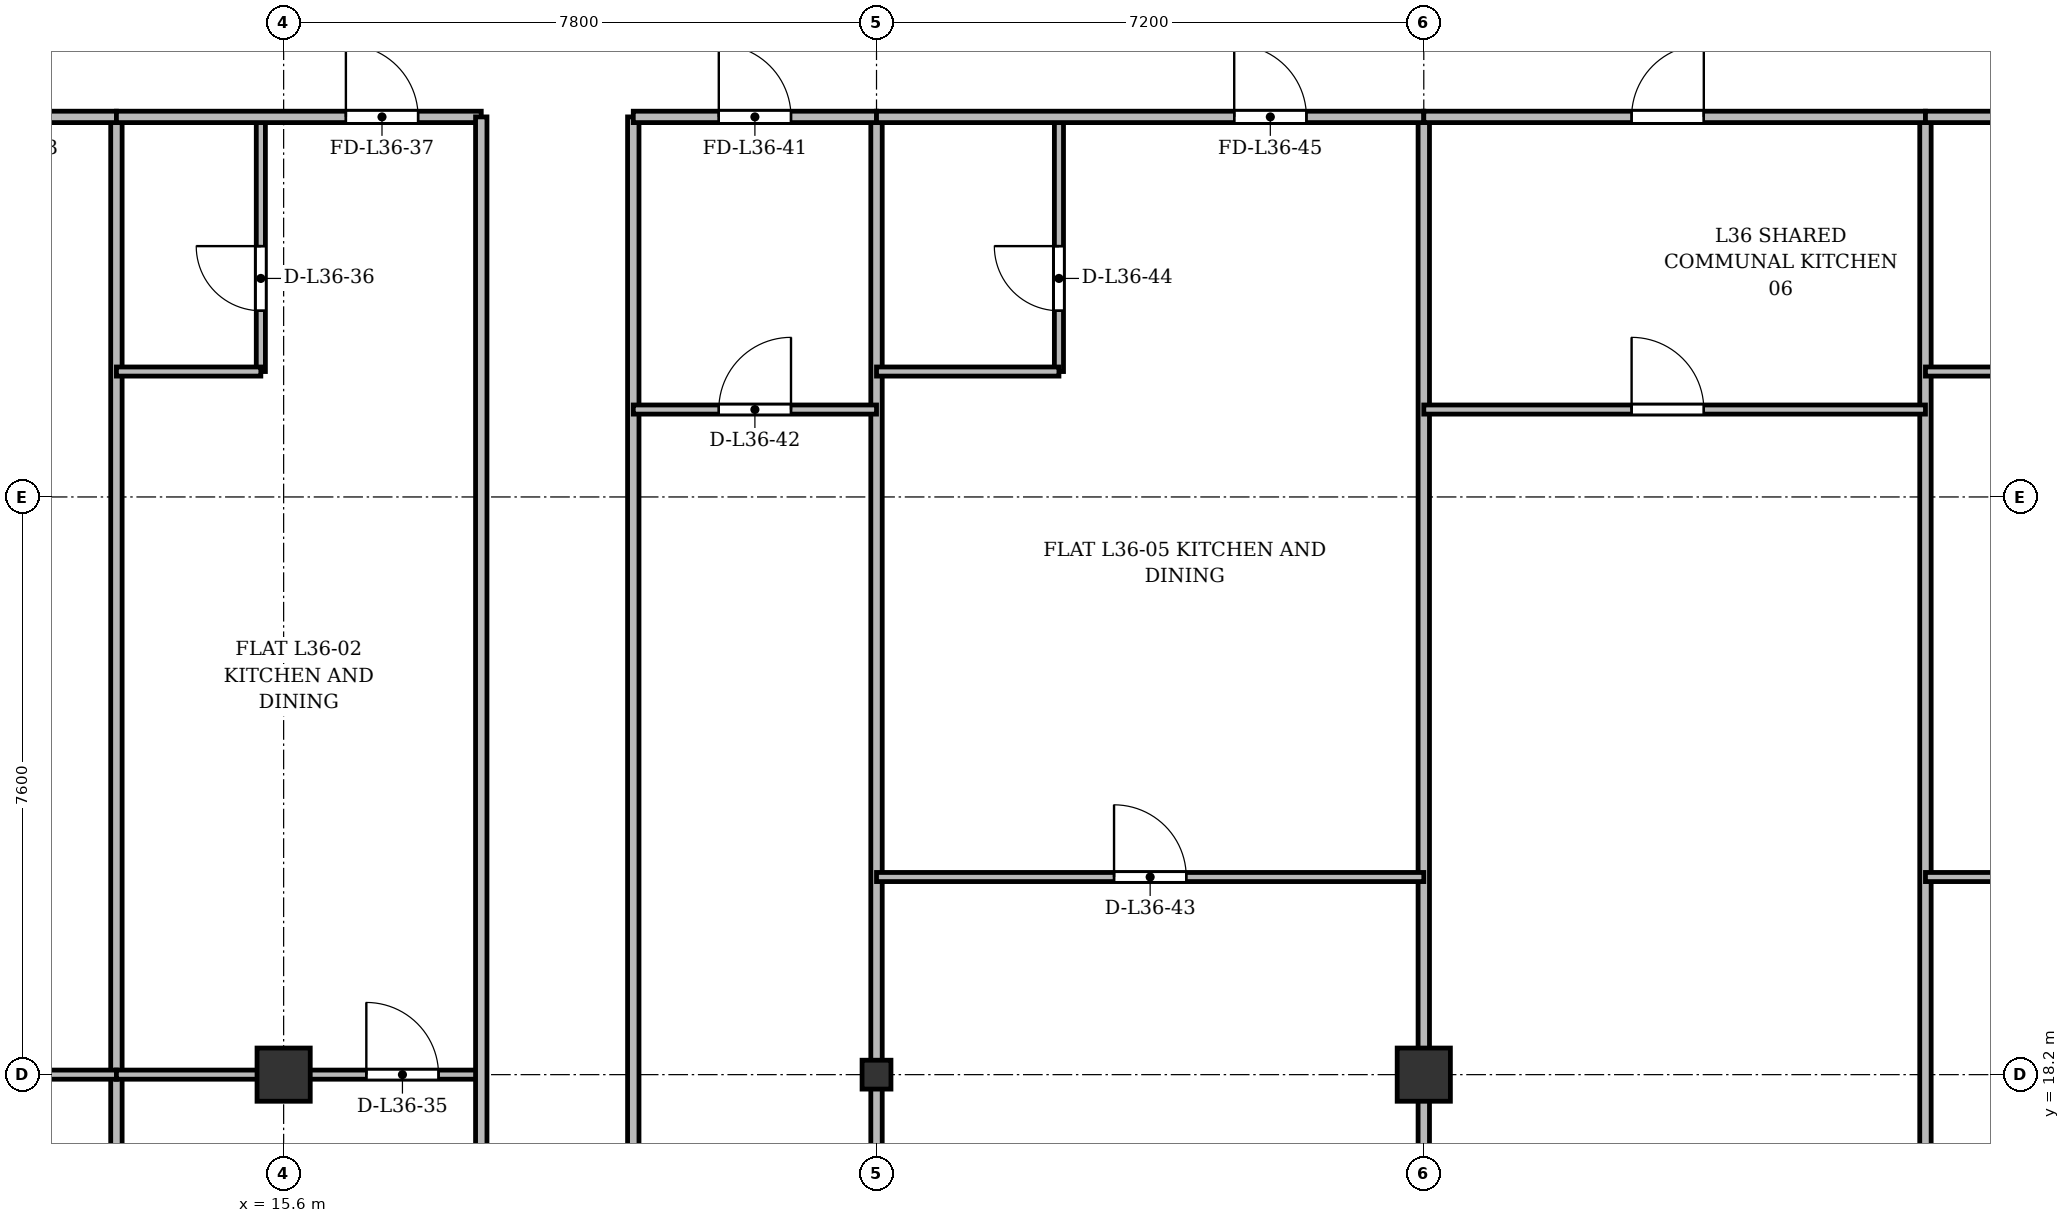
"""IFC4 building model, lengths in metres.
Left out: names, types, materials, properties, quantities, classifications, styles, units other than length and angle.
Written with IfcOpenShell. Run it as: python <this file> out.ifc"""

import sys

from ifc_helpers import new_model, si_unit, direction, frame, frame_2d, origin, origin_2d, place, context, subcontext, project, spatial, rectangle, i_section, extrude, source, transform, mapped, element, fill, save


model = new_model("IFC4")
c1 = context("Model", 3, precision=1e-05, world=origin(), true_north=direction((0.0, 1.0)))
c2 = subcontext(c1, "Body", "Model", "MODEL_VIEW")
j1 = project(units=[si_unit("LENGTHUNIT", "METRE"), si_unit("PLANEANGLEUNIT", "RADIAN")], contexts=[c1])
p1 = place(None, origin())
s1 = spatial("IfcSite", under=j1, at=p1, CompositionType="ELEMENT")
p2 = place(p1, origin())
s2 = spatial("IfcBuilding", under=s1, at=p2, CompositionType="ELEMENT")
p3 = place(p2, frame((0.0, 0.0, 139.3)))
s3 = spatial("IfcBuildingStorey", under=s2, at=p3, CompositionType="ELEMENT", Elevation=139.3)
m1 = source(origin(), c2, "Body", "SweptSolid", [
    extrude(rectangle(XDim=0.7, YDim=0.7, at=origin_2d()), origin(), (0.0, 0.0, 1.0), 3.6),
])
p4 = place(p3, frame((15.6, 18.2, 0.0), z_axis=(0.0, 0.0, 1.0), x_axis=(1.0, 0.0, 0.0)))
e1 = element("IfcColumn", 1, at=p4, inside=s3, PredefinedType="COLUMN", context=c2, shape_type="MappedRepresentation", body=[
    mapped(m1, transform((0.0, 0.0, 0.0), x_axis=(1.0, 0.0, 0.0), y_axis=(0.0, 1.0, 0.0), z_axis=(0.0, 0.0, 1.0), scale=1.0)),
])
m2 = source(origin(), c2, "Body", "SweptSolid", [
    extrude(i_section(OverallWidth=0.38, OverallDepth=0.38, WebThickness=0.02, FlangeThickness=0.03, at=origin_2d()), origin(), (0.0, 0.0, 1.0), 3.6),
])
p5 = place(p3, frame((23.4, 18.2, 0.0), z_axis=(0.0, 0.0, 1.0), x_axis=(1.0, 0.0, 0.0)))
e2 = element("IfcColumn", 2, at=p5, inside=s3, PredefinedType="COLUMN", context=c2, shape_type="MappedRepresentation", body=[
    mapped(m2, transform((0.0, 0.0, 0.0), x_axis=(1.0, 0.0, 0.0), y_axis=(0.0, 1.0, 0.0), z_axis=(0.0, 0.0, 1.0), scale=1.0)),
])
p6 = place(p3, frame((30.6, 18.2, 0.0), z_axis=(0.0, 0.0, 1.0), x_axis=(1.0, 0.0, 0.0)))
e3 = element("IfcColumn", 3, at=p6, inside=s3, PredefinedType="COLUMN", context=c2, shape_type="MappedRepresentation", body=[
    mapped(m1, transform((0.0, 0.0, 0.0), x_axis=(1.0, 0.0, 0.0), y_axis=(0.0, 1.0, 0.0), z_axis=(0.0, 0.0, 1.0), scale=1.0)),
])
p7 = place(p3, frame((13.4, 3.525, 0.0), z_axis=(0.0, 0.0, 1.0), x_axis=(0.0, 1.0, 0.0)))
e4 = element("IfcWall", 4, at=p7, inside=s3, PredefinedType="PARTITIONING", context=c2, shape_type="SweptSolid", body=[
    extrude(rectangle(XDim=27.275, YDim=0.15, at=frame_2d((13.638, 0.0))), origin(), (0.0, 0.0, 1.0), 2.75),
])
for number, where, z_axis, x_axis in (
    (5, (23.4, 3.525, 0.0), (0.0, 0.0, 1.0), (0.0, 1.0, 0.0)),
    (6, (30.6, 3.525, 0.0), (0.0, 0.0, 1.0), (0.0, 1.0, 0.0)),
):
    element("IfcWall", number, at=place(p3, frame(where, z_axis=z_axis, x_axis=x_axis)), inside=s3, PredefinedType="PARTITIONING", context=c2, shape_type="SweptSolid", body=[
        extrude(rectangle(XDim=27.275, YDim=0.15, at=frame_2d((13.638, 0.0))), origin(), (0.0, 0.0, 1.0), 2.85),
    ])
p8 = place(p3, frame((37.2, 3.525, 0.0), z_axis=(0.0, 0.0, 1.0), x_axis=(0.0, 1.0, 0.0)))
e7 = element("IfcWall", 7, at=p8, inside=s3, PredefinedType="PARTITIONING", context=c2, shape_type="SweptSolid", body=[
    extrude(rectangle(XDim=27.275, YDim=0.15, at=frame_2d((13.638, 0.0))), origin(), (0.0, 0.0, 1.0), 2.75),
])
p9 = place(p3, frame((8.04, 18.2, 0.0), z_axis=(0.0, 0.0, 1.0), x_axis=(1.0, 0.0, 0.0)))
e8 = element("IfcWall", 8, at=p9, inside=s3, PredefinedType="PARTITIONING", context=c2, shape_type="SweptSolid", body=[
    extrude(rectangle(XDim=5.36, YDim=0.12, at=frame_2d((2.68, 0.0))), origin(), (0.0, 0.0, 1.0), 2.75),
])
p10 = place(p9, frame((2.205, 0.0, 0.0)))
e9 = element("IfcOpeningElement", 9, at=p10, cuts=e8, PredefinedType="OPENING", context=c2, shape_type="SweptSolid", body=[
    extrude(rectangle(XDim=0.95, YDim=2.15, at=frame_2d((0.475, 1.075))), frame((0.0, 0.07, 0.0), z_axis=(0.0, -1.0, 0.0), x_axis=(1.0, 0.0, 0.0)), (0.0, 0.0, 1.0), 0.14),
])
p11 = place(p3, frame((8.025, 30.8, 0.0), z_axis=(0.0, 0.0, 1.0), x_axis=(1.0, 0.0, 0.0)))
e10 = element("IfcWall", 10, at=p11, inside=s3, PredefinedType="PARTITIONING", context=c2, shape_type="SweptSolid", body=[
    extrude(rectangle(XDim=5.375, YDim=0.15, at=frame_2d((2.688, 0.0))), origin(), (0.0, 0.0, 1.0), 2.85),
])
p12 = place(p11, frame((3.44, 0.0, 0.0)))
e11 = element("IfcOpeningElement", 11, at=p12, cuts=e10, PredefinedType="OPENING", context=c2, shape_type="SweptSolid", body=[
    extrude(rectangle(XDim=0.95, YDim=2.15, at=frame_2d((0.475, 1.075))), frame((0.0, 0.085, 0.0), z_axis=(0.0, -1.0, 0.0), x_axis=(1.0, 0.0, 0.0)), (0.0, 0.0, 1.0), 0.17),
])
p13 = place(p3, frame((13.4, 18.2, 0.0), z_axis=(0.0, 0.0, 1.0), x_axis=(1.0, 0.0, 0.0)))
e12 = element("IfcWall", 12, at=p13, inside=s3, PredefinedType="PARTITIONING", context=c2, shape_type="SweptSolid", body=[
    extrude(rectangle(XDim=4.8, YDim=0.12, at=frame_2d((2.4, 0.0))), origin(), (0.0, 0.0, 1.0), 2.75),
])
p14 = place(p13, frame((3.288, 0.0, 0.0)))
e13 = element("IfcOpeningElement", 13, at=p14, cuts=e12, PredefinedType="OPENING", context=c2, shape_type="SweptSolid", body=[
    extrude(rectangle(XDim=0.95, YDim=2.15, at=frame_2d((0.475, 1.075))), frame((0.0, 0.07, 0.0), z_axis=(0.0, -1.0, 0.0), x_axis=(1.0, 0.0, 0.0)), (0.0, 0.0, 1.0), 0.14),
])
p15 = place(p3, frame((15.3, 27.45, 0.0), z_axis=(0.0, 0.0, 1.0), x_axis=(0.0, 1.0, 0.0)))
e14 = element("IfcWall", 14, at=p15, inside=s3, PredefinedType="PARTITIONING", context=c2, shape_type="SweptSolid", body=[
    extrude(rectangle(XDim=3.35, YDim=0.12, at=frame_2d((1.675, 0.0))), origin(), (0.0, 0.0, 1.0), 3.35),
])
p16 = place(p15, frame((0.8, 0.0, 0.0)))
e15 = element("IfcOpeningElement", 15, at=p16, cuts=e14, PredefinedType="OPENING", context=c2, shape_type="SweptSolid", body=[
    extrude(rectangle(XDim=0.85, YDim=2.1, at=frame_2d((0.425, 1.05))), frame((0.0, 0.07, 0.0), z_axis=(0.0, -1.0, 0.0), x_axis=(1.0, 0.0, 0.0)), (0.0, 0.0, 1.0), 0.14),
])
p17 = place(p3, frame((13.4, 27.45, 0.0), z_axis=(0.0, 0.0, 1.0), x_axis=(1.0, 0.0, 0.0)))
e16 = element("IfcWall", 16, at=p17, inside=s3, PredefinedType="PARTITIONING", context=c2, shape_type="SweptSolid", body=[
    extrude(rectangle(XDim=1.9, YDim=0.12, at=frame_2d((0.95, 0.0))), origin(), (0.0, 0.0, 1.0), 3.35),
])
p18 = place(p3, frame((13.4, 30.8, 0.0), z_axis=(0.0, 0.0, 1.0), x_axis=(1.0, 0.0, 0.0)))
e17 = element("IfcWall", 17, at=p18, inside=s3, PredefinedType="PARTITIONING", context=c2, shape_type="SweptSolid", body=[
    extrude(rectangle(XDim=4.8, YDim=0.15, at=frame_2d((2.4, 0.0))), origin(), (0.0, 0.0, 1.0), 2.85),
])
p19 = place(p18, frame((3.019, 0.0, 0.0)))
e18 = element("IfcOpeningElement", 18, at=p19, cuts=e17, PredefinedType="OPENING", context=c2, shape_type="SweptSolid", body=[
    extrude(rectangle(XDim=0.95, YDim=2.15, at=frame_2d((0.475, 1.075))), frame((0.0, 0.085, 0.0), z_axis=(0.0, -1.0, 0.0), x_axis=(1.0, 0.0, 0.0)), (0.0, 0.0, 1.0), 0.17),
])
for number, where, z_axis, x_axis in (
    (19, (18.2, 3.525, 0.0), (0.0, 0.0, 1.0), (0.0, 1.0, 0.0)),
    (20, (20.2, 3.525, 0.0), (0.0, 0.0, 1.0), (0.0, 1.0, 0.0)),
):
    element("IfcWall", number, at=place(p3, frame(where, z_axis=z_axis, x_axis=x_axis)), inside=s3, PredefinedType="PARTITIONING", context=c2, shape_type="SweptSolid", body=[
        extrude(rectangle(XDim=27.275, YDim=0.15, at=frame_2d((13.638, 0.0))), origin(), (0.0, 0.0, 1.0), 2.75),
    ])
p20 = place(p3, frame((20.2, 30.8, 0.0), z_axis=(0.0, 0.0, 1.0), x_axis=(1.0, 0.0, 0.0)))
e21 = element("IfcWall", 21, at=p20, inside=s3, PredefinedType="PARTITIONING", context=c2, shape_type="SweptSolid", body=[
    extrude(rectangle(XDim=3.2, YDim=0.15, at=frame_2d((1.6, 0.0))), origin(), (0.0, 0.0, 1.0), 2.85),
])
p21 = place(p20, frame((1.125, 0.0, 0.0)))
e22 = element("IfcOpeningElement", 22, at=p21, cuts=e21, PredefinedType="OPENING", context=c2, shape_type="SweptSolid", body=[
    extrude(rectangle(XDim=0.95, YDim=2.15, at=frame_2d((0.475, 1.075))), frame((0.0, 0.085, 0.0), z_axis=(0.0, -1.0, 0.0), x_axis=(1.0, 0.0, 0.0)), (0.0, 0.0, 1.0), 0.17),
])
p22 = place(p3, frame((20.2, 26.95, 0.0), z_axis=(0.0, 0.0, 1.0), x_axis=(1.0, 0.0, 0.0)))
e23 = element("IfcWall", 23, at=p22, inside=s3, PredefinedType="PARTITIONING", context=c2, shape_type="SweptSolid", body=[
    extrude(rectangle(XDim=3.2, YDim=0.12, at=frame_2d((1.6, 0.0))), origin(), (0.0, 0.0, 1.0), 2.85),
])
p23 = place(p22, frame((1.125, 0.0, 0.0)))
e24 = element("IfcOpeningElement", 24, at=p23, cuts=e23, PredefinedType="OPENING", context=c2, shape_type="SweptSolid", body=[
    extrude(rectangle(XDim=0.95, YDim=2.15, at=frame_2d((0.475, 1.075))), frame((0.0, 0.07, 0.0), z_axis=(0.0, -1.0, 0.0), x_axis=(1.0, 0.0, 0.0)), (0.0, 0.0, 1.0), 0.14),
])
p24 = place(p3, frame((23.4, 20.8, 0.0), z_axis=(0.0, 0.0, 1.0), x_axis=(1.0, 0.0, 0.0)))
e25 = element("IfcWall", 25, at=p24, inside=s3, PredefinedType="PARTITIONING", context=c2, shape_type="SweptSolid", body=[
    extrude(rectangle(XDim=7.2, YDim=0.12, at=frame_2d((3.6, 0.0))), origin(), (0.0, 0.0, 1.0), 2.85),
])
p25 = place(p24, frame((3.125, 0.0, 0.0)))
e26 = element("IfcOpeningElement", 26, at=p25, cuts=e25, PredefinedType="OPENING", context=c2, shape_type="SweptSolid", body=[
    extrude(rectangle(XDim=0.95, YDim=2.15, at=frame_2d((0.475, 1.075))), frame((0.0, 0.07, 0.0), z_axis=(0.0, -1.0, 0.0), x_axis=(1.0, 0.0, 0.0)), (0.0, 0.0, 1.0), 0.14),
])
p26 = place(p3, frame((25.8, 27.45, 0.0), z_axis=(0.0, 0.0, 1.0), x_axis=(0.0, 1.0, 0.0)))
e27 = element("IfcWall", 27, at=p26, inside=s3, PredefinedType="PARTITIONING", context=c2, shape_type="SweptSolid", body=[
    extrude(rectangle(XDim=3.35, YDim=0.12, at=frame_2d((1.675, 0.0))), origin(), (0.0, 0.0, 1.0), 3.35),
])
p27 = place(p26, frame((0.8, 0.0, 0.0)))
e28 = element("IfcOpeningElement", 28, at=p27, cuts=e27, PredefinedType="OPENING", context=c2, shape_type="SweptSolid", body=[
    extrude(rectangle(XDim=0.85, YDim=2.1, at=frame_2d((0.425, 1.05))), frame((0.0, 0.07, 0.0), z_axis=(0.0, -1.0, 0.0), x_axis=(1.0, 0.0, 0.0)), (0.0, 0.0, 1.0), 0.14),
])
p28 = place(p3, frame((23.4, 27.45, 0.0), z_axis=(0.0, 0.0, 1.0), x_axis=(1.0, 0.0, 0.0)))
e29 = element("IfcWall", 29, at=p28, inside=s3, PredefinedType="PARTITIONING", context=c2, shape_type="SweptSolid", body=[
    extrude(rectangle(XDim=2.4, YDim=0.12, at=frame_2d((1.2, 0.0))), origin(), (0.0, 0.0, 1.0), 2.85),
])
p29 = place(p3, frame((23.4, 30.8, 0.0), z_axis=(0.0, 0.0, 1.0), x_axis=(1.0, 0.0, 0.0)))
e30 = element("IfcWall", 30, at=p29, inside=s3, PredefinedType="PARTITIONING", context=c2, shape_type="SweptSolid", body=[
    extrude(rectangle(XDim=7.2, YDim=0.15, at=frame_2d((3.6, 0.0))), origin(), (0.0, 0.0, 1.0), 2.85),
])
p30 = place(p29, frame((4.706, 0.0, 0.0)))
e31 = element("IfcOpeningElement", 31, at=p30, cuts=e30, PredefinedType="OPENING", context=c2, shape_type="SweptSolid", body=[
    extrude(rectangle(XDim=0.95, YDim=2.15, at=frame_2d((0.475, 1.075))), frame((0.0, 0.085, 0.0), z_axis=(0.0, -1.0, 0.0), x_axis=(1.0, 0.0, 0.0)), (0.0, 0.0, 1.0), 0.17),
])
p31 = place(p3, frame((30.6, 30.8, 0.0), z_axis=(0.0, 0.0, 1.0), x_axis=(1.0, 0.0, 0.0)))
e32 = element("IfcWall", 32, at=p31, inside=s3, PredefinedType="PARTITIONING", context=c2, shape_type="SweptSolid", body=[
    extrude(rectangle(XDim=6.6, YDim=0.15, at=frame_2d((3.3, 0.0))), origin(), (0.0, 0.0, 1.0), 2.85),
])
p32 = place(p31, frame((2.734, 0.0, 0.0)))
e33 = element("IfcOpeningElement", 33, at=p32, cuts=e32, PredefinedType="OPENING", context=c2, shape_type="SweptSolid", body=[
    extrude(rectangle(XDim=0.95, YDim=2.15, at=frame_2d((0.475, 1.075))), frame((0.0, 0.085, 0.0), z_axis=(0.0, -1.0, 0.0), x_axis=(1.0, 0.0, 0.0)), (0.0, 0.0, 1.0), 0.17),
])
p33 = place(p3, frame((30.6, 26.95, 0.0), z_axis=(0.0, 0.0, 1.0), x_axis=(1.0, 0.0, 0.0)))
e34 = element("IfcWall", 34, at=p33, inside=s3, PredefinedType="PARTITIONING", context=c2, shape_type="SweptSolid", body=[
    extrude(rectangle(XDim=6.6, YDim=0.12, at=frame_2d((3.3, 0.0))), origin(), (0.0, 0.0, 1.0), 2.85),
])
p34 = place(p33, frame((2.734, 0.0, 0.0)))
e35 = element("IfcOpeningElement", 35, at=p34, cuts=e34, PredefinedType="OPENING", context=c2, shape_type="SweptSolid", body=[
    extrude(rectangle(XDim=0.95, YDim=2.15, at=frame_2d((0.475, 1.075))), frame((0.0, 0.07, 0.0), z_axis=(0.0, -1.0, 0.0), x_axis=(1.0, 0.0, 0.0)), (0.0, 0.0, 1.0), 0.14),
])
p35 = place(p3, frame((37.2, 20.8, 0.0), z_axis=(0.0, 0.0, 1.0), x_axis=(1.0, 0.0, 0.0)))
e36 = element("IfcWall", 36, at=p35, inside=s3, PredefinedType="PARTITIONING", context=c2, shape_type="SweptSolid", body=[
    extrude(rectangle(XDim=6.6, YDim=0.12, at=frame_2d((3.3, 0.0))), origin(), (0.0, 0.0, 1.0), 2.85),
])
p36 = place(p35, frame((2.734, 0.0, 0.0)))
e37 = element("IfcOpeningElement", 37, at=p36, cuts=e36, PredefinedType="OPENING", context=c2, shape_type="SweptSolid", body=[
    extrude(rectangle(XDim=0.95, YDim=2.15, at=frame_2d((0.475, 1.075))), frame((0.0, 0.07, 0.0), z_axis=(0.0, -1.0, 0.0), x_axis=(1.0, 0.0, 0.0)), (0.0, 0.0, 1.0), 0.14),
])
p37 = place(p3, frame((37.2, 27.45, 0.0), z_axis=(0.0, 0.0, 1.0), x_axis=(1.0, 0.0, 0.0)))
e38 = element("IfcWall", 38, at=p37, inside=s3, PredefinedType="PARTITIONING", context=c2, shape_type="SweptSolid", body=[
    extrude(rectangle(XDim=2.294, YDim=0.12, at=frame_2d((1.147, 0.0))), origin(), (0.0, 0.0, 1.0), 3.35),
])
p38 = place(p3, frame((37.2, 30.8, 0.0), z_axis=(0.0, 0.0, 1.0), x_axis=(1.0, 0.0, 0.0)))
e39 = element("IfcWall", 39, at=p38, inside=s3, PredefinedType="PARTITIONING", context=c2, shape_type="SweptSolid", body=[
    extrude(rectangle(XDim=6.6, YDim=0.15, at=frame_2d((3.3, 0.0))), origin(), (0.0, 0.0, 1.0), 2.85),
])
p39 = place(p38, frame((4.337, 0.0, 0.0)))
e40 = element("IfcOpeningElement", 40, at=p39, cuts=e39, PredefinedType="OPENING", context=c2, shape_type="SweptSolid", body=[
    extrude(rectangle(XDim=0.95, YDim=2.15, at=frame_2d((0.475, 1.075))), frame((0.0, 0.085, 0.0), z_axis=(0.0, -1.0, 0.0), x_axis=(1.0, 0.0, 0.0)), (0.0, 0.0, 1.0), 0.17),
])
m3 = source(origin(), c2, "Body", "SweptSolid", [
    extrude(rectangle(XDim=0.95, YDim=2.15, at=frame_2d((0.475, 1.075))), frame((0.0, 0.025, 0.0), z_axis=(0.0, -1.0, 0.0), x_axis=(1.0, 0.0, 0.0)), (0.0, 0.0, 1.0), 0.05),
])
p40 = place(p14, origin())
e41 = element("IfcDoor", 41, at=p40, inside=s3, OperationType="SINGLE_SWING_LEFT", PredefinedType="DOOR", context=c2, shape_type="MappedRepresentation", body=[
    mapped(m3, transform((0.0, 0.0, 0.0), x_axis=(1.0, 0.0, 0.0), y_axis=(0.0, 1.0, 0.0), z_axis=(0.0, 0.0, 1.0), scale=1.0)),
])
fill(e13, e41)
m4 = source(origin(), c2, "Body", "SweptSolid", [
    extrude(rectangle(XDim=0.85, YDim=2.1, at=frame_2d((0.425, 1.05))), frame((0.0, 0.025, 0.0), z_axis=(0.0, -1.0, 0.0), x_axis=(1.0, 0.0, 0.0)), (0.0, 0.0, 1.0), 0.05),
])
p41 = place(p16, origin())
e42 = element("IfcDoor", 42, at=p41, inside=s3, OperationType="SINGLE_SWING_RIGHT", PredefinedType="DOOR", context=c2, shape_type="MappedRepresentation", body=[
    mapped(m4, transform((0.0, 0.0, 0.0), x_axis=(1.0, 0.0, 0.0), y_axis=(0.0, 1.0, 0.0), z_axis=(0.0, 0.0, 1.0), scale=1.0)),
])
fill(e15, e42)
p42 = place(p19, origin())
e43 = element("IfcDoor", 43, at=p42, inside=s3, OperationType="SINGLE_SWING_LEFT", PredefinedType="DOOR", context=c2, shape_type="MappedRepresentation", body=[
    mapped(m3, transform((0.0, 0.0, 0.0), x_axis=(1.0, 0.0, 0.0), y_axis=(0.0, 1.0, 0.0), z_axis=(0.0, 0.0, 1.0), scale=1.0)),
])
fill(e18, e43)
p43 = place(p21, origin())
e44 = element("IfcDoor", 44, at=p43, inside=s3, OperationType="SINGLE_SWING_LEFT", PredefinedType="DOOR", context=c2, shape_type="MappedRepresentation", body=[
    mapped(m3, transform((0.0, 0.0, 0.0), x_axis=(1.0, 0.0, 0.0), y_axis=(0.0, 1.0, 0.0), z_axis=(0.0, 0.0, 1.0), scale=1.0)),
])
fill(e22, e44)
p44 = place(p23, origin())
e45 = element("IfcDoor", 45, at=p44, inside=s3, OperationType="SINGLE_SWING_RIGHT", PredefinedType="DOOR", context=c2, shape_type="MappedRepresentation", body=[
    mapped(m3, transform((0.0, 0.0, 0.0), x_axis=(1.0, 0.0, 0.0), y_axis=(0.0, 1.0, 0.0), z_axis=(0.0, 0.0, 1.0), scale=1.0)),
])
fill(e24, e45)
p45 = place(p25, origin())
e46 = element("IfcDoor", 46, at=p45, inside=s3, OperationType="SINGLE_SWING_LEFT", PredefinedType="DOOR", context=c2, shape_type="MappedRepresentation", body=[
    mapped(m3, transform((0.0, 0.0, 0.0), x_axis=(1.0, 0.0, 0.0), y_axis=(0.0, 1.0, 0.0), z_axis=(0.0, 0.0, 1.0), scale=1.0)),
])
fill(e26, e46)
p46 = place(p27, origin())
e47 = element("IfcDoor", 47, at=p46, inside=s3, OperationType="SINGLE_SWING_RIGHT", PredefinedType="DOOR", context=c2, shape_type="MappedRepresentation", body=[
    mapped(m4, transform((0.0, 0.0, 0.0), x_axis=(1.0, 0.0, 0.0), y_axis=(0.0, 1.0, 0.0), z_axis=(0.0, 0.0, 1.0), scale=1.0)),
])
fill(e28, e47)
p47 = place(p30, origin())
e48 = element("IfcDoor", 48, at=p47, inside=s3, OperationType="SINGLE_SWING_LEFT", PredefinedType="DOOR", context=c2, shape_type="MappedRepresentation", body=[
    mapped(m3, transform((0.0, 0.0, 0.0), x_axis=(1.0, 0.0, 0.0), y_axis=(0.0, 1.0, 0.0), z_axis=(0.0, 0.0, 1.0), scale=1.0)),
])
fill(e31, e48)
p48 = place(p32, origin())
e49 = element("IfcDoor", 49, at=p48, inside=s3, OperationType="SINGLE_SWING_RIGHT", PredefinedType="DOOR", context=c2, shape_type="MappedRepresentation", body=[
    mapped(m3, transform((0.0, 0.0, 0.0), x_axis=(1.0, 0.0, 0.0), y_axis=(0.0, 1.0, 0.0), z_axis=(0.0, 0.0, 1.0), scale=1.0)),
])
fill(e33, e49)
p49 = place(p34, origin())
e50 = element("IfcDoor", 50, at=p49, inside=s3, OperationType="SINGLE_SWING_LEFT", PredefinedType="DOOR", context=c2, shape_type="MappedRepresentation", body=[
    mapped(m3, transform((0.0, 0.0, 0.0), x_axis=(1.0, 0.0, 0.0), y_axis=(0.0, 1.0, 0.0), z_axis=(0.0, 0.0, 1.0), scale=1.0)),
])
fill(e35, e50)
save(model, sys.argv[1])
